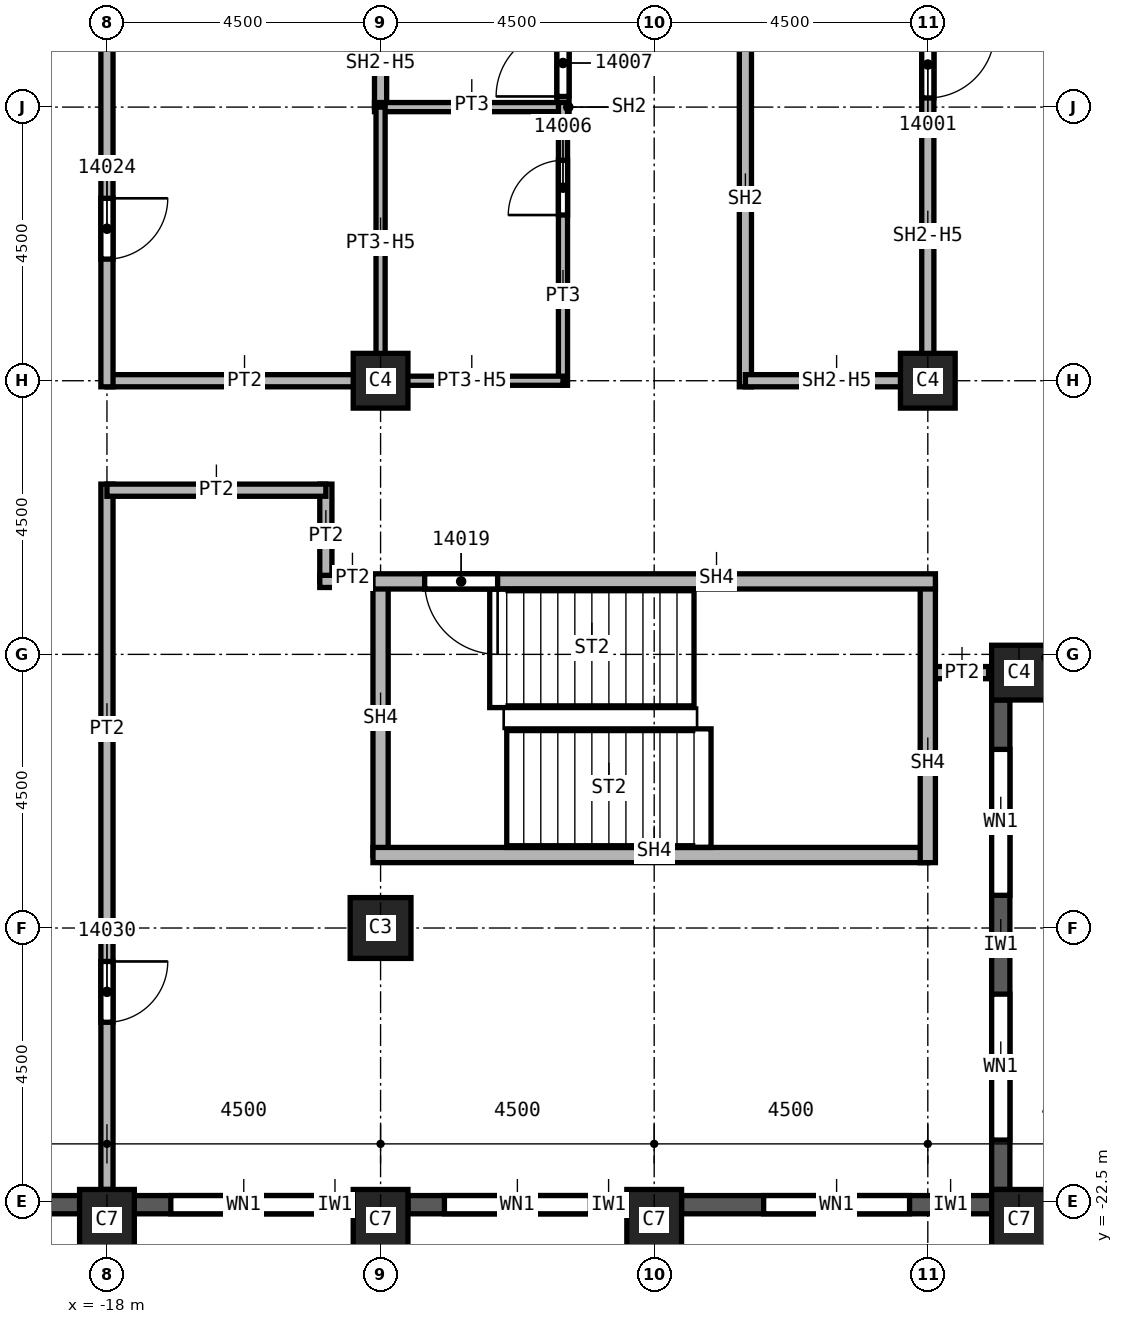
"""IFC4 building model, lengths in metres.
Left out: names, types, materials, properties, quantities, classifications, styles, units other than length and angle.
Written with IfcOpenShell. Run it as: python <this file> out.ifc"""

import sys

from ifc_helpers import new_model, si_unit, direction, frame, frame_2d, origin, origin_2d, place, context, subcontext, project, spatial, rectangle, extrude, element, fill, save


model = new_model("IFC4")
c1 = context("Model", 3, precision=1e-05, world=origin(), true_north=direction((0.0, 1.0)))
c2 = subcontext(c1, "Body", "Model", "MODEL_VIEW")
j1 = project(units=[si_unit("LENGTHUNIT", "METRE"), si_unit("PLANEANGLEUNIT", "RADIAN")], contexts=[c1])
p1 = place(None, origin())
s1 = spatial("IfcSite", under=j1, at=p1, CompositionType="ELEMENT")
p2 = place(p1, origin())
s2 = spatial("IfcBuilding", under=s1, at=p2, CompositionType="ELEMENT")
p3 = place(p2, frame((0.0, 0.0, 220.0)))
s3 = spatial("IfcBuildingStorey", under=s2, at=p3, CompositionType="ELEMENT", Elevation=220.0)
p4 = place(p3, frame((-13.5, -18.0, 0.0), z_axis=(0.0, 0.0, 1.0), x_axis=(1.0, 0.0, 0.0)))
e1 = element("IfcColumn", 1, at=p4, inside=s3, PredefinedType="COLUMN", context=c2, shape_type="SweptSolid", body=[
    extrude(rectangle(XDim=1.0, YDim=1.0, at=origin_2d()), origin(), (0.0, 0.0, 1.0), 3.72),
])
for number, where, z_axis, x_axis in (
    (2, (-4.5, -9.0, 0.0), (0.0, 0.0, 1.0), (1.0, 0.0, 0.0)),
    (3, (-13.5, -9.0, 0.0), (0.0, 0.0, 1.0), (1.0, 0.0, 0.0)),
):
    element("IfcColumn", number, at=place(p3, frame(where, z_axis=z_axis, x_axis=x_axis)), inside=s3, PredefinedType="COLUMN", context=c2, shape_type="SweptSolid", body=[
        extrude(rectangle(XDim=0.9, YDim=0.9, at=origin_2d()), origin(), (0.0, 0.0, 1.0), 3.72),
    ])
for number, where, z_axis, x_axis in (
    (4, (-3.0, -22.8, 0.0), (0.0, 0.0, 1.0), (1.0, 0.0, 0.0)),
    (5, (-9.0, -22.8, 0.0), (0.0, 0.0, 1.0), (1.0, 0.0, 0.0)),
    (6, (-13.5, -22.8, 0.0), (0.0, 0.0, 1.0), (1.0, 0.0, 0.0)),
    (7, (-18.0, -22.8, 0.0), (0.0, 0.0, 1.0), (1.0, 0.0, 0.0)),
):
    element("IfcColumn", number, at=place(p3, frame(where, z_axis=z_axis, x_axis=x_axis)), inside=s3, PredefinedType="COLUMN", context=c2, shape_type="SweptSolid", body=[
        extrude(rectangle(XDim=0.9, YDim=1.0, at=origin_2d()), origin(), (0.0, 0.0, 1.0), 3.72),
    ])
p5 = place(p3, frame((-3.0, -13.8, 0.0), z_axis=(0.0, 0.0, 1.0), x_axis=(1.0, 0.0, 0.0)))
e8 = element("IfcColumn", 8, at=p5, inside=s3, PredefinedType="COLUMN", context=c2, shape_type="SweptSolid", body=[
    extrude(rectangle(XDim=0.9, YDim=0.9, at=origin_2d()), origin(), (0.0, 0.0, 1.0), 3.72),
])
p6 = place(p3, frame((-22.05, -22.55, 0.0), z_axis=(0.0, 0.0, 1.0), x_axis=(1.0, 0.0, 0.0)))
e9 = element("IfcWall", 9, at=p6, inside=s3, PredefinedType="SOLIDWALL", context=c2, shape_type="SweptSolid", body=[
    extrude(rectangle(XDim=3.6, YDim=0.3, at=frame_2d((1.8, 0.0))), origin(), (0.0, 0.0, 1.0), 3.12),
])
p7 = place(p6, frame((0.775, 0.0, 0.8)))
e10 = element("IfcOpeningElement", 10, at=p7, cuts=e9, PredefinedType="OPENING", context=c2, shape_type="SweptSolid", body=[
    extrude(rectangle(XDim=1.0, YDim=1.95, at=frame_2d((0.5, 0.975))), frame((0.0, 0.15, 0.0), z_axis=(0.0, -1.0, 0.0), x_axis=(1.0, 0.0, 0.0)), (0.0, 0.0, 1.0), 0.3),
])
p8 = place(p6, frame((2.375, 0.0, 0.8)))
e11 = element("IfcOpeningElement", 11, at=p8, cuts=e9, PredefinedType="OPENING", context=c2, shape_type="SweptSolid", body=[
    extrude(rectangle(XDim=0.6, YDim=1.95, at=frame_2d((0.3, 0.975))), frame((0.0, 0.15, 0.0), z_axis=(0.0, -1.0, 0.0), x_axis=(1.0, 0.0, 0.0)), (0.0, 0.0, 1.0), 0.3),
])
p9 = place(p3, frame((-17.55, -22.55, 0.0), z_axis=(0.0, 0.0, 1.0), x_axis=(1.0, 0.0, 0.0)))
e12 = element("IfcWall", 12, at=p9, inside=s3, PredefinedType="SOLIDWALL", context=c2, shape_type="SweptSolid", body=[
    extrude(rectangle(XDim=3.6, YDim=0.3, at=frame_2d((1.8, 0.0))), origin(), (0.0, 0.0, 1.0), 3.12),
])
p10 = place(p9, frame((0.6, 0.0, 0.8)))
e13 = element("IfcOpeningElement", 13, at=p10, cuts=e12, PredefinedType="OPENING", context=c2, shape_type="SweptSolid", body=[
    extrude(rectangle(XDim=2.4, YDim=1.95, at=frame_2d((1.2, 0.975))), frame((0.0, 0.15, 0.0), z_axis=(0.0, -1.0, 0.0), x_axis=(1.0, 0.0, 0.0)), (0.0, 0.0, 1.0), 0.3),
])
p11 = place(p3, frame((-13.05, -22.55, 0.0), z_axis=(0.0, 0.0, 1.0), x_axis=(1.0, 0.0, 0.0)))
e14 = element("IfcWall", 14, at=p11, inside=s3, PredefinedType="SOLIDWALL", context=c2, shape_type="SweptSolid", body=[
    extrude(rectangle(XDim=3.6, YDim=0.3, at=frame_2d((1.8, 0.0))), origin(), (0.0, 0.0, 1.0), 3.12),
])
p12 = place(p11, frame((0.6, 0.0, 0.8)))
e15 = element("IfcOpeningElement", 15, at=p12, cuts=e14, PredefinedType="OPENING", context=c2, shape_type="SweptSolid", body=[
    extrude(rectangle(XDim=2.4, YDim=1.95, at=frame_2d((1.2, 0.975))), frame((0.0, 0.15, 0.0), z_axis=(0.0, -1.0, 0.0), x_axis=(1.0, 0.0, 0.0)), (0.0, 0.0, 1.0), 0.3),
])
p13 = place(p3, frame((-8.55, -22.55, 0.0), z_axis=(0.0, 0.0, 1.0), x_axis=(1.0, 0.0, 0.0)))
e16 = element("IfcWall", 16, at=p13, inside=s3, PredefinedType="SOLIDWALL", context=c2, shape_type="SweptSolid", body=[
    extrude(rectangle(XDim=5.1, YDim=0.3, at=frame_2d((2.55, 0.0))), origin(), (0.0, 0.0, 1.0), 3.12),
])
p14 = place(p13, frame((1.35, 0.0, 0.8)))
e17 = element("IfcOpeningElement", 17, at=p14, cuts=e16, PredefinedType="OPENING", context=c2, shape_type="SweptSolid", body=[
    extrude(rectangle(XDim=2.4, YDim=1.95, at=frame_2d((1.2, 0.975))), frame((0.0, 0.15, 0.0), z_axis=(0.0, -1.0, 0.0), x_axis=(1.0, 0.0, 0.0)), (0.0, 0.0, 1.0), 0.3),
])
p15 = place(p3, frame((-3.3, -22.3, 0.0), z_axis=(0.0, 0.0, 1.0), x_axis=(0.0, 1.0, 0.0)))
e18 = element("IfcWall", 18, at=p15, inside=s3, PredefinedType="SOLIDWALL", context=c2, shape_type="SweptSolid", body=[
    extrude(rectangle(XDim=8.05, YDim=0.3, at=frame_2d((4.025, 0.0))), origin(), (0.0, 0.0, 1.0), 3.12),
])
p16 = place(p15, frame((0.812, 0.0, 0.8)))
e19 = element("IfcOpeningElement", 19, at=p16, cuts=e18, PredefinedType="OPENING", context=c2, shape_type="SweptSolid", body=[
    extrude(rectangle(XDim=2.4, YDim=1.95, at=frame_2d((1.2, 0.975))), frame((0.0, 0.15, 0.0), z_axis=(0.0, -1.0, 0.0), x_axis=(1.0, 0.0, 0.0)), (0.0, 0.0, 1.0), 0.3),
])
p17 = place(p15, frame((4.837, 0.0, 0.8)))
e20 = element("IfcOpeningElement", 20, at=p17, cuts=e18, PredefinedType="OPENING", context=c2, shape_type="SweptSolid", body=[
    extrude(rectangle(XDim=2.4, YDim=1.95, at=frame_2d((1.2, 0.975))), frame((0.0, 0.15, 0.0), z_axis=(0.0, -1.0, 0.0), x_axis=(1.0, 0.0, 0.0)), (0.0, 0.0, 1.0), 0.3),
])
p18 = place(p3, frame((-18.0, -10.7, 0.0), z_axis=(0.0, 0.0, 1.0), x_axis=(0.0, -1.0, 0.0)))
e21 = element("IfcWall", 21, at=p18, inside=s3, PredefinedType="PARTITIONING", context=c2, shape_type="SweptSolid", body=[
    extrude(rectangle(XDim=11.6, YDim=0.2, at=frame_2d((5.8, 0.0))), origin(), (0.0, 0.0, 1.0), 3.72),
])
p19 = place(p18, frame((7.85, 0.0, 0.0)))
e22 = element("IfcOpeningElement", 22, at=p19, cuts=e21, PredefinedType="OPENING", context=c2, shape_type="SweptSolid", body=[
    extrude(rectangle(XDim=1.0, YDim=2.1, at=frame_2d((0.5, 1.05))), frame((0.0, 0.1, 0.0), z_axis=(0.0, -1.0, 0.0), x_axis=(1.0, 0.0, 0.0)), (0.0, 0.0, 1.0), 0.2),
])
p20 = place(p3, frame((-18.0, -9.0, 0.0), z_axis=(0.0, 0.0, 1.0), x_axis=(1.0, 0.0, 0.0)))
e23 = element("IfcWall", 23, at=p20, inside=s3, PredefinedType="PARTITIONING", context=c2, shape_type="SweptSolid", body=[
    extrude(rectangle(XDim=4.5, YDim=0.2, at=frame_2d((2.25, 0.0))), origin(), (0.0, 0.0, 1.0), 3.72),
])
p21 = place(p3, frame((-18.0, 9.1, 0.0), z_axis=(0.0, 0.0, 1.0), x_axis=(0.0, -1.0, 0.0)))
e24 = element("IfcWall", 24, at=p21, inside=s3, PredefinedType="PARTITIONING", context=c2, shape_type="SweptSolid", body=[
    extrude(rectangle(XDim=18.2, YDim=0.2, at=frame_2d((9.1, 0.0))), origin(), (0.0, 0.0, 1.0), 3.72),
])
p22 = place(p21, frame((15.1, 0.0, 0.0)))
e25 = element("IfcOpeningElement", 25, at=p22, cuts=e24, PredefinedType="OPENING", context=c2, shape_type="SweptSolid", body=[
    extrude(rectangle(XDim=1.0, YDim=2.1, at=frame_2d((0.5, 1.05))), frame((0.0, 0.1, 0.0), z_axis=(0.0, -1.0, 0.0), x_axis=(1.0, 0.0, 0.0)), (0.0, 0.0, 1.0), 0.2),
])
p23 = place(p21, frame((5.2, 0.0, 0.0)))
e26 = element("IfcOpeningElement", 26, at=p23, cuts=e24, PredefinedType="OPENING", context=c2, shape_type="SweptSolid", body=[
    extrude(rectangle(XDim=1.0, YDim=2.1, at=frame_2d((0.5, 1.05))), frame((0.0, 0.1, 0.0), z_axis=(0.0, -1.0, 0.0), x_axis=(1.0, 0.0, 0.0)), (0.0, 0.0, 1.0), 0.2),
])
p24 = place(p3, frame((-14.4, -12.3, 0.0), z_axis=(0.0, 0.0, 1.0), x_axis=(0.0, 1.0, 0.0)))
e27 = element("IfcWall", 27, at=p24, inside=s3, PredefinedType="PARTITIONING", context=c2, shape_type="SweptSolid", body=[
    extrude(rectangle(XDim=1.6, YDim=0.2, at=frame_2d((0.8, 0.0))), origin(), (0.0, 0.0, 1.0), 3.72),
])
p25 = place(p3, frame((-14.4, -10.8, 0.0), z_axis=(0.0, 0.0, 1.0), x_axis=(-1.0, 0.0, 0.0)))
e28 = element("IfcWall", 28, at=p25, inside=s3, PredefinedType="PARTITIONING", context=c2, shape_type="SweptSolid", body=[
    extrude(rectangle(XDim=3.6, YDim=0.2, at=frame_2d((1.8, 0.0))), origin(), (0.0, 0.0, 1.0), 3.72),
])
p26 = place(p3, frame((-13.375, -12.3, 0.0), z_axis=(0.0, 0.0, 1.0), x_axis=(-1.0, 0.0, 0.0)))
e29 = element("IfcWall", 29, at=p26, inside=s3, PredefinedType="PARTITIONING", context=c2, shape_type="SweptSolid", body=[
    extrude(rectangle(XDim=1.125, YDim=0.2, at=frame_2d((0.562, 0.0))), origin(), (0.0, 0.0, 1.0), 3.72),
])
p27 = place(p3, frame((-3.5, -13.8, 0.0), z_axis=(0.0, 0.0, 1.0), x_axis=(-1.0, 0.0, 0.0)))
e30 = element("IfcWall", 30, at=p27, inside=s3, PredefinedType="PARTITIONING", context=c2, shape_type="SweptSolid", body=[
    extrude(rectangle(XDim=1.0, YDim=0.2, at=frame_2d((0.5, 0.0))), origin(), (0.0, 0.0, 1.0), 3.72),
])
p28 = place(p3, frame((-13.5, -4.5, 0.0), z_axis=(0.0, 0.0, 1.0), x_axis=(0.0, 1.0, 0.0)))
e31 = element("IfcWall", 31, at=p28, inside=s3, PredefinedType="SOLIDWALL", context=c2, shape_type="SweptSolid", body=[
    extrude(rectangle(XDim=1.5, YDim=0.2, at=frame_2d((0.75, 0.0))), origin(), (0.0, 0.0, 1.0), 2.958),
])
p29 = place(p3, frame((-10.5, -4.575, 0.0), z_axis=(0.0, 0.0, 1.0), x_axis=(0.0, 1.0, 0.0)))
e32 = element("IfcWall", 32, at=p29, inside=s3, PredefinedType="SOLIDWALL", context=c2, shape_type="SweptSolid", body=[
    extrude(rectangle(XDim=1.7, YDim=0.2, at=frame_2d((0.85, 0.0))), origin(), (0.0, 0.0, 1.0), 3.72),
])
p30 = place(p29, frame((0.25, 0.0, 0.0)))
e33 = element("IfcOpeningElement", 33, at=p30, cuts=e32, PredefinedType="OPENING", context=c2, shape_type="SweptSolid", body=[
    extrude(rectangle(XDim=1.1, YDim=2.1, at=frame_2d((0.55, 1.05))), frame((0.0, 0.1, 0.0), z_axis=(0.0, -1.0, 0.0), x_axis=(1.0, 0.0, 0.0)), (0.0, 0.0, 1.0), 0.2),
])
p31 = place(p3, frame((-7.5, -9.1, 0.0), z_axis=(0.0, 0.0, 1.0), x_axis=(0.0, 1.0, 0.0)))
e34 = element("IfcWall", 34, at=p31, inside=s3, PredefinedType="SOLIDWALL", context=c2, shape_type="SweptSolid", body=[
    extrude(rectangle(XDim=6.225, YDim=0.2, at=frame_2d((3.113, 0.0))), origin(), (0.0, 0.0, 1.0), 3.72),
])
p32 = place(p3, frame((-4.5, -9.0, 0.0), z_axis=(0.0, 0.0, 1.0), x_axis=(-1.0, 0.0, 0.0)))
e35 = element("IfcWall", 35, at=p32, inside=s3, PredefinedType="SOLIDWALL", context=c2, shape_type="SweptSolid", body=[
    extrude(rectangle(XDim=3.0, YDim=0.2, at=frame_2d((1.5, 0.0))), origin(), (0.0, 0.0, 1.0), 2.958),
])
p33 = place(p3, frame((-4.5, 0.0, 0.0), z_axis=(0.0, 0.0, 1.0), x_axis=(0.0, -1.0, 0.0)))
e36 = element("IfcWall", 36, at=p33, inside=s3, PredefinedType="SOLIDWALL", context=c2, shape_type="SweptSolid", body=[
    extrude(rectangle(XDim=9.1, YDim=0.2, at=frame_2d((4.55, 0.0))), origin(), (0.0, 0.0, 1.0), 2.958),
])
p34 = place(p33, frame((3.25, 0.0, 0.0)))
e37 = element("IfcOpeningElement", 37, at=p34, cuts=e36, PredefinedType="OPENING", context=c2, shape_type="SweptSolid", body=[
    extrude(rectangle(XDim=1.1, YDim=2.1, at=frame_2d((0.55, 1.05))), frame((0.0, 0.1, 0.0), z_axis=(0.0, -1.0, 0.0), x_axis=(1.0, 0.0, 0.0)), (0.0, 0.0, 1.0), 0.2),
])
p35 = place(p33, frame((1.6, 0.0, 0.0)))
e38 = element("IfcOpeningElement", 38, at=p35, cuts=e36, PredefinedType="OPENING", context=c2, shape_type="SweptSolid", body=[
    extrude(rectangle(XDim=1.1, YDim=2.1, at=frame_2d((0.55, 1.05))), frame((0.0, 0.1, 0.0), z_axis=(0.0, -1.0, 0.0), x_axis=(1.0, 0.0, 0.0)), (0.0, 0.0, 1.0), 0.2),
])
p36 = place(p3, frame((-13.5, -16.8, 0.0), z_axis=(0.0, 0.0, 1.0), x_axis=(0.0, 1.0, 0.0)))
e39 = element("IfcWall", 39, at=p36, inside=s3, PredefinedType="SOLIDWALL", context=c2, shape_type="SweptSolid", body=[
    extrude(rectangle(XDim=4.5, YDim=0.25, at=frame_2d((2.25, 0.0))), origin(), (0.0, 0.0, 1.0), 3.72),
])
p37 = place(p3, frame((-4.5, -16.8, 0.0), z_axis=(0.0, 0.0, 1.0), x_axis=(-1.0, 0.0, 0.0)))
e40 = element("IfcWall", 40, at=p37, inside=s3, PredefinedType="SOLIDWALL", context=c2, shape_type="SweptSolid", body=[
    extrude(rectangle(XDim=9.125, YDim=0.25, at=frame_2d((4.562, 0.0))), origin(), (0.0, 0.0, 1.0), 3.72),
])
p38 = place(p3, frame((-4.5, -12.3, 0.0), z_axis=(0.0, 0.0, 1.0), x_axis=(0.0, -1.0, 0.0)))
e41 = element("IfcWall", 41, at=p38, inside=s3, PredefinedType="SOLIDWALL", context=c2, shape_type="SweptSolid", body=[
    extrude(rectangle(XDim=4.625, YDim=0.25, at=frame_2d((2.312, 0.0))), origin(), (0.0, 0.0, 1.0), 3.72),
])
p39 = place(p3, frame((-4.375, -12.3, 0.0), z_axis=(0.0, 0.0, 1.0), x_axis=(-1.0, 0.0, 0.0)))
e42 = element("IfcWall", 42, at=p39, inside=s3, PredefinedType="SOLIDWALL", context=c2, shape_type="SweptSolid", body=[
    extrude(rectangle(XDim=9.25, YDim=0.25, at=frame_2d((4.625, 0.0))), origin(), (0.0, 0.0, 1.0), 3.72),
])
p40 = place(p39, frame((7.2, 0.0, 0.0)))
e43 = element("IfcOpeningElement", 43, at=p40, cuts=e42, PredefinedType="OPENING", context=c2, shape_type="SweptSolid", body=[
    extrude(rectangle(XDim=1.2, YDim=2.1, at=frame_2d((0.6, 1.05))), frame((0.0, 0.125, 0.0), z_axis=(0.0, -1.0, 0.0), x_axis=(1.0, 0.0, 0.0)), (0.0, 0.0, 1.0), 0.25),
])
p41 = place(p3, frame((-13.6, -4.5, 0.0), z_axis=(0.0, 0.0, 1.0), x_axis=(1.0, 0.0, 0.0)))
e44 = element("IfcWall", 44, at=p41, inside=s3, PredefinedType="PARTITIONING", context=c2, shape_type="SweptSolid", body=[
    extrude(rectangle(XDim=3.1, YDim=0.15, at=frame_2d((1.55, 0.0))), origin(), (0.0, 0.0, 1.0), 3.72),
])
p42 = place(p3, frame((-13.5, -9.1, 0.0), z_axis=(0.0, 0.0, 1.0), x_axis=(0.0, 1.0, 0.0)))
e45 = element("IfcWall", 45, at=p42, inside=s3, PredefinedType="PARTITIONING", context=c2, shape_type="SweptSolid", body=[
    extrude(rectangle(XDim=4.6, YDim=0.15, at=frame_2d((2.3, 0.0))), origin(), (0.0, 0.0, 1.0), 2.958),
])
p43 = place(p3, frame((-10.5, -9.075, 0.0), z_axis=(0.0, 0.0, 1.0), x_axis=(0.0, 1.0, 0.0)))
e46 = element("IfcWall", 46, at=p43, inside=s3, PredefinedType="PARTITIONING", context=c2, shape_type="SweptSolid", body=[
    extrude(rectangle(XDim=4.65, YDim=0.15, at=frame_2d((2.325, 0.0))), origin(), (0.0, 0.0, 1.0), 3.72),
])
p44 = place(p43, frame((2.8, 0.0, 0.0)))
e47 = element("IfcOpeningElement", 47, at=p44, cuts=e46, PredefinedType="OPENING", context=c2, shape_type="SweptSolid", body=[
    extrude(rectangle(XDim=0.9, YDim=2.1, at=frame_2d((0.45, 1.05))), frame((0.0, 0.075, 0.0), z_axis=(0.0, -1.0, 0.0), x_axis=(1.0, 0.0, 0.0)), (0.0, 0.0, 1.0), 0.15),
])
p45 = place(p3, frame((-10.5, -9.0, 0.0), z_axis=(0.0, 0.0, 1.0), x_axis=(-1.0, 0.0, 0.0)))
e48 = element("IfcWall", 48, at=p45, inside=s3, PredefinedType="PARTITIONING", context=c2, shape_type="SweptSolid", body=[
    extrude(rectangle(XDim=3.075, YDim=0.15, at=frame_2d((1.538, 0.0))), origin(), (0.0, 0.0, 1.0), 2.958),
])
p46 = place(p10, origin())
e49 = element("IfcWindow", 49, at=p46, inside=s3, PartitioningType="SINGLE_PANEL", PredefinedType="WINDOW", context=c2, shape_type="SweptSolid", body=[
    extrude(rectangle(XDim=2.4, YDim=1.95, at=frame_2d((1.2, 0.975))), frame((0.0, 0.03, 0.0), z_axis=(0.0, -1.0, 0.0), x_axis=(1.0, 0.0, 0.0)), (0.0, 0.0, 1.0), 0.06),
])
fill(e13, e49)
p47 = place(p12, origin())
e50 = element("IfcWindow", 50, at=p47, inside=s3, PartitioningType="SINGLE_PANEL", PredefinedType="WINDOW", context=c2, shape_type="SweptSolid", body=[
    extrude(rectangle(XDim=2.4, YDim=1.95, at=frame_2d((1.2, 0.975))), frame((0.0, 0.03, 0.0), z_axis=(0.0, -1.0, 0.0), x_axis=(1.0, 0.0, 0.0)), (0.0, 0.0, 1.0), 0.06),
])
fill(e15, e50)
p48 = place(p14, origin())
e51 = element("IfcWindow", 51, at=p48, inside=s3, PartitioningType="SINGLE_PANEL", PredefinedType="WINDOW", context=c2, shape_type="SweptSolid", body=[
    extrude(rectangle(XDim=2.4, YDim=1.95, at=frame_2d((1.2, 0.975))), frame((0.0, 0.03, 0.0), z_axis=(0.0, -1.0, 0.0), x_axis=(1.0, 0.0, 0.0)), (0.0, 0.0, 1.0), 0.06),
])
fill(e17, e51)
p49 = place(p16, origin())
e52 = element("IfcWindow", 52, at=p49, inside=s3, PartitioningType="SINGLE_PANEL", PredefinedType="WINDOW", context=c2, shape_type="SweptSolid", body=[
    extrude(rectangle(XDim=2.4, YDim=1.95, at=frame_2d((1.2, 0.975))), frame((0.0, 0.03, 0.0), z_axis=(0.0, -1.0, 0.0), x_axis=(1.0, 0.0, 0.0)), (0.0, 0.0, 1.0), 0.06),
])
fill(e19, e52)
p50 = place(p17, origin())
e53 = element("IfcWindow", 53, at=p50, inside=s3, PartitioningType="SINGLE_PANEL", PredefinedType="WINDOW", context=c2, shape_type="SweptSolid", body=[
    extrude(rectangle(XDim=2.4, YDim=1.95, at=frame_2d((1.2, 0.975))), frame((0.0, 0.03, 0.0), z_axis=(0.0, -1.0, 0.0), x_axis=(1.0, 0.0, 0.0)), (0.0, 0.0, 1.0), 0.06),
])
fill(e20, e53)
p51 = place(p34, origin())
e54 = element("IfcDoor", 54, at=p51, inside=s3, OperationType="SINGLE_SWING_RIGHT", PredefinedType="DOOR", context=c2, shape_type="SweptSolid", body=[
    extrude(rectangle(XDim=1.1, YDim=2.1, at=frame_2d((0.55, 1.05))), frame((0.0, 0.025, 0.0), z_axis=(0.0, -1.0, 0.0), x_axis=(1.0, 0.0, 0.0)), (0.0, 0.0, 1.0), 0.05),
])
fill(e37, e54)
p52 = place(p44, origin())
e55 = element("IfcDoor", 55, at=p52, inside=s3, OperationType="SINGLE_SWING_LEFT", PredefinedType="DOOR", context=c2, shape_type="SweptSolid", body=[
    extrude(rectangle(XDim=0.9, YDim=2.1, at=frame_2d((0.45, 1.05))), frame((0.0, 0.025, 0.0), z_axis=(0.0, -1.0, 0.0), x_axis=(1.0, 0.0, 0.0)), (0.0, 0.0, 1.0), 0.05),
])
fill(e47, e55)
p53 = place(p30, origin())
e56 = element("IfcDoor", 56, at=p53, inside=s3, OperationType="SINGLE_SWING_RIGHT", PredefinedType="DOOR", context=c2, shape_type="SweptSolid", body=[
    extrude(rectangle(XDim=1.1, YDim=2.1, at=frame_2d((0.55, 1.05))), frame((0.0, 0.025, 0.0), z_axis=(0.0, -1.0, 0.0), x_axis=(1.0, 0.0, 0.0)), (0.0, 0.0, 1.0), 0.05),
])
fill(e33, e56)
p54 = place(p40, origin())
e57 = element("IfcDoor", 57, at=p54, inside=s3, OperationType="SINGLE_SWING_RIGHT", PredefinedType="DOOR", context=c2, shape_type="SweptSolid", body=[
    extrude(rectangle(XDim=1.2, YDim=2.1, at=frame_2d((0.6, 1.05))), frame((0.0, 0.025, 0.0), z_axis=(0.0, -1.0, 0.0), x_axis=(1.0, 0.0, 0.0)), (0.0, 0.0, 1.0), 0.05),
])
fill(e43, e57)
p55 = place(p22, origin())
e58 = element("IfcDoor", 58, at=p55, inside=s3, OperationType="SINGLE_SWING_LEFT", PredefinedType="DOOR", context=c2, shape_type="SweptSolid", body=[
    extrude(rectangle(XDim=1.0, YDim=2.1, at=frame_2d((0.5, 1.05))), frame((0.0, 0.025, 0.0), z_axis=(0.0, -1.0, 0.0), x_axis=(1.0, 0.0, 0.0)), (0.0, 0.0, 1.0), 0.05),
])
fill(e25, e58)
p56 = place(p19, origin())
e59 = element("IfcDoor", 59, at=p56, inside=s3, OperationType="SINGLE_SWING_LEFT", PredefinedType="DOOR", context=c2, shape_type="SweptSolid", body=[
    extrude(rectangle(XDim=1.0, YDim=2.1, at=frame_2d((0.5, 1.05))), frame((0.0, 0.025, 0.0), z_axis=(0.0, -1.0, 0.0), x_axis=(1.0, 0.0, 0.0)), (0.0, 0.0, 1.0), 0.05),
])
fill(e22, e59)
save(model, sys.argv[1])
